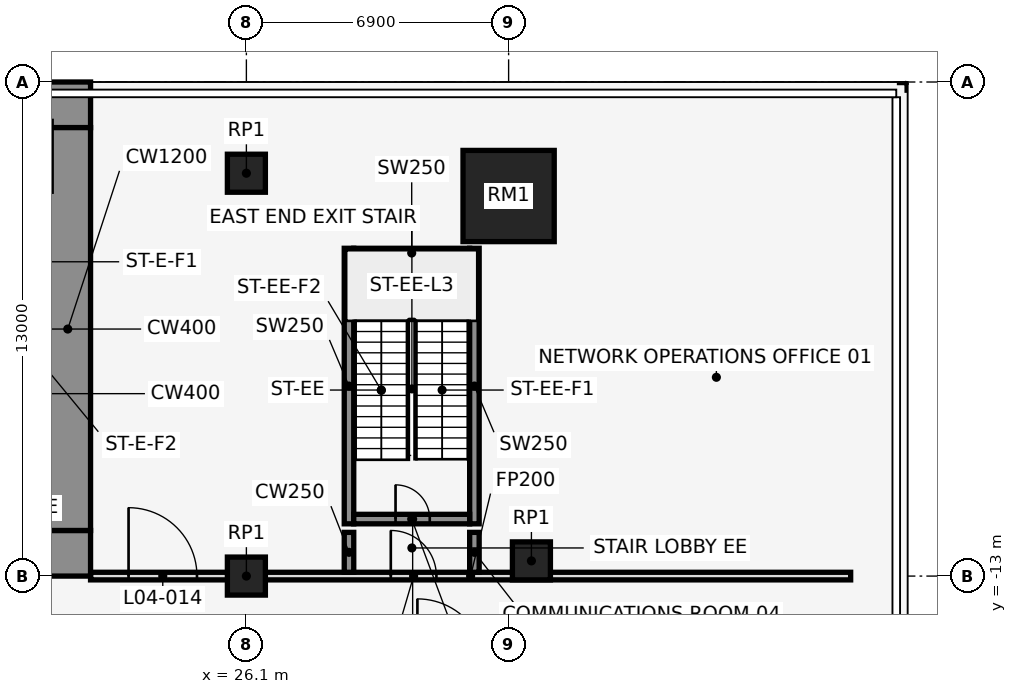
"""IFC4 building model, lengths in metres.
Left out: names, types, materials, properties, quantities, classifications, styles, units other than length and angle.
Written with IfcOpenShell. Run it as: python <this file> out.ifc"""

import sys

from ifc_helpers import new_model, si_unit, direction, frame, frame_2d, origin, origin_2d, place, context, subcontext, project, spatial, rectangle, extrude, element, fill, save


model = new_model("IFC4")
c1 = context("Model", 3, precision=1e-05, world=origin(), true_north=direction((0.0, 1.0)))
c2 = subcontext(c1, "Body", "Model", "MODEL_VIEW")
j1 = project(units=[si_unit("LENGTHUNIT", "METRE"), si_unit("PLANEANGLEUNIT", "RADIAN")], contexts=[c1])
p1 = place(None, origin())
s1 = spatial("IfcSite", under=j1, at=p1, CompositionType="ELEMENT")
p2 = place(p1, origin())
s2 = spatial("IfcBuilding", under=s1, at=p2, CompositionType="ELEMENT")
p3 = place(p2, frame((0.0, 0.0, 25.0)))
s3 = spatial("IfcBuildingStorey", under=s2, at=p3, CompositionType="ELEMENT", Elevation=25.0)
p4 = place(p3, frame((26.1, -2.4, 0.0), z_axis=(0.0, 0.0, 1.0), x_axis=(1.0, 0.0, 0.0)))
e1 = element("IfcColumn", 1, at=p4, inside=s3, PredefinedType="COLUMN", context=c2, shape_type="SweptSolid", body=[
    extrude(rectangle(XDim=1.0, YDim=1.0, at=origin_2d()), origin(), (0.0, 0.0, 1.0), 5.0),
])
p5 = place(p3, frame((33.0, -3.0, 0.0), z_axis=(0.0, 0.0, 1.0), x_axis=(1.0, 0.0, 0.0)))
e2 = element("IfcColumn", 2, at=p5, inside=s3, PredefinedType="COLUMN", context=c2, shape_type="SweptSolid", body=[
    extrude(rectangle(XDim=2.4, YDim=2.4, at=origin_2d()), origin(), (0.0, 0.0, 1.0), 5.0),
])
for number, where, z_axis, x_axis in (
    (3, (33.6, -12.6, 0.0), (0.0, 0.0, 1.0), (1.0, 0.0, 0.0)),
    (4, (26.1, -13.0, 0.0), (0.0, 0.0, 1.0), (1.0, 0.0, 0.0)),
):
    element("IfcColumn", number, at=place(p3, frame(where, z_axis=z_axis, x_axis=x_axis)), inside=s3, PredefinedType="COLUMN", context=c2, shape_type="SweptSolid", body=[
        extrude(rectangle(XDim=1.0, YDim=1.0, at=origin_2d()), origin(), (0.0, 0.0, 1.0), 5.0),
    ])
for number, where, z_axis, x_axis in (
    (5, (28.8, -11.625, 0.0), (0.0, 0.0, 1.0), (0.0, 1.0, 0.0)),
    (6, (32.1, -11.625, 0.0), (0.0, 0.0, 1.0), (0.0, 1.0, 0.0)),
):
    element("IfcWall", number, at=place(p3, frame(where, z_axis=z_axis, x_axis=x_axis)), inside=s3, PredefinedType="SHEAR", context=c2, shape_type="SweptSolid", body=[
        extrude(rectangle(XDim=7.25, YDim=0.25, at=frame_2d((3.625, 0.0))), origin(), (0.0, 0.0, 1.0), 5.0),
    ])
p6 = place(p3, frame((28.925, -11.5, 0.0), z_axis=(0.0, 0.0, 1.0), x_axis=(1.0, 0.0, 0.0)))
e7 = element("IfcWall", 7, at=p6, inside=s3, PredefinedType="SHEAR", context=c2, shape_type="SweptSolid", body=[
    extrude(rectangle(XDim=3.05, YDim=0.25, at=frame_2d((1.525, 0.0))), origin(), (0.0, 0.0, 1.0), 5.0),
])
p7 = place(p6, frame((1.1, 0.0, 0.0)))
e8 = element("IfcOpeningElement", 8, at=p7, cuts=e7, PredefinedType="OPENING", context=c2, shape_type="SweptSolid", body=[
    extrude(rectangle(XDim=0.9, YDim=2.1, at=frame_2d((0.45, 1.05))), frame((0.0, 0.137, 0.0), z_axis=(0.0, -1.0, 0.0), x_axis=(1.0, 0.0, 0.0)), (0.0, 0.0, 1.0), 0.274),
])
p8 = place(p3, frame((28.925, -4.5, 0.0), z_axis=(0.0, 0.0, 1.0), x_axis=(1.0, 0.0, 0.0)))
e9 = element("IfcWall", 9, at=p8, inside=s3, PredefinedType="SHEAR", context=c2, shape_type="SweptSolid", body=[
    extrude(rectangle(XDim=3.05, YDim=0.25, at=frame_2d((1.525, 0.0))), origin(), (0.0, 0.0, 1.0), 5.0),
])
p9 = place(p3, frame((22.0, -13.0, 0.0), z_axis=(0.0, 0.0, 1.0), x_axis=(1.0, 0.0, 0.0)))
e10 = element("IfcWall", 10, at=p9, inside=s3, PredefinedType="PARTITIONING", context=c2, shape_type="SweptSolid", body=[
    extrude(rectangle(XDim=20.0, YDim=0.2, at=frame_2d((10.0, 0.0))), origin(), (0.0, 0.0, 1.0), 4.7),
])
p10 = place(p9, frame((7.9, 0.0, 0.0)))
e11 = element("IfcOpeningElement", 11, at=p10, cuts=e10, PredefinedType="OPENING", context=c2, shape_type="SweptSolid", body=[
    extrude(rectangle(XDim=1.2, YDim=2.1, at=frame_2d((0.6, 1.05))), frame((0.0, 0.112, 0.0), z_axis=(0.0, -1.0, 0.0), x_axis=(1.0, 0.0, 0.0)), (0.0, 0.0, 1.0), 0.224),
])
p11 = place(p9, frame((1.0, 0.0, 0.0)))
e12 = element("IfcOpeningElement", 12, at=p11, cuts=e10, PredefinedType="OPENING", context=c2, shape_type="SweptSolid", body=[
    extrude(rectangle(XDim=1.8, YDim=2.1, at=frame_2d((0.9, 1.05))), frame((0.0, 0.112, 0.0), z_axis=(0.0, -1.0, 0.0), x_axis=(1.0, 0.0, 0.0)), (0.0, 0.0, 1.0), 0.224),
])
for number, where, z_axis, x_axis in (
    (13, (28.8, -12.9, 0.0), (0.0, 0.0, 1.0), (0.0, 1.0, 0.0)),
    (14, (32.1, -12.9, 0.0), (0.0, 0.0, 1.0), (0.0, 1.0, 0.0)),
):
    element("IfcWall", number, at=place(p3, frame(where, z_axis=z_axis, x_axis=x_axis)), inside=s3, PredefinedType="SHEAR", context=c2, shape_type="SweptSolid", body=[
        extrude(rectangle(XDim=1.05, YDim=0.25, at=frame_2d((0.525, 0.0))), origin(), (0.0, 0.0, 1.0), 5.0),
    ])
p12 = place(p3, frame((-22.0, -0.6, 0.0), z_axis=(0.0, 0.0, 1.0), x_axis=(1.0, 0.0, 0.0)))
e15 = element("IfcWall", 15, at=p12, inside=s3, PredefinedType="SHEAR", context=c2, shape_type="SweptSolid", body=[
    extrude(rectangle(XDim=44.0, YDim=1.2, at=frame_2d((22.0, 0.0))), origin(), (0.0, 0.0, 1.0), 5.0),
])
p13 = place(p3, frame((-22.0, -12.4, 0.0), z_axis=(0.0, 0.0, 1.0), x_axis=(1.0, 0.0, 0.0)))
e16 = element("IfcWall", 16, at=p13, inside=s3, PredefinedType="SHEAR", context=c2, shape_type="SweptSolid", body=[
    extrude(rectangle(XDim=44.0, YDim=1.2, at=frame_2d((22.0, 0.0))), origin(), (0.0, 0.0, 1.0), 5.0),
])
p14 = place(p13, frame((2.2, 0.0, 0.0)))
e17 = element("IfcOpeningElement", 17, at=p14, cuts=e16, PredefinedType="OPENING", context=c2, shape_type="SweptSolid", body=[
    extrude(rectangle(XDim=1.2, YDim=2.1, at=frame_2d((0.6, 1.05))), frame((0.0, 0.612, 0.0), z_axis=(0.0, -1.0, 0.0), x_axis=(1.0, 0.0, 0.0)), (0.0, 0.0, 1.0), 1.224),
])
p15 = place(p13, frame((21.4, 0.0, 0.0)))
e18 = element("IfcOpeningElement", 18, at=p15, cuts=e16, PredefinedType="OPENING", context=c2, shape_type="SweptSolid", body=[
    extrude(rectangle(XDim=1.2, YDim=2.1, at=frame_2d((0.6, 1.05))), frame((0.0, 0.612, 0.0), z_axis=(0.0, -1.0, 0.0), x_axis=(1.0, 0.0, 0.0)), (0.0, 0.0, 1.0), 1.224),
])
p16 = place(p13, frame((40.6, 0.0, 0.0)))
e19 = element("IfcOpeningElement", 19, at=p16, cuts=e16, PredefinedType="OPENING", context=c2, shape_type="SweptSolid", body=[
    extrude(rectangle(XDim=1.2, YDim=2.1, at=frame_2d((0.6, 1.05))), frame((0.0, 0.612, 0.0), z_axis=(0.0, -1.0, 0.0), x_axis=(1.0, 0.0, 0.0)), (0.0, 0.0, 1.0), 1.224),
])
p17 = place(p13, frame((16.0, 0.0, 0.0)))
e20 = element("IfcOpeningElement", 20, at=p17, cuts=e16, PredefinedType="OPENING", context=c2, shape_type="SweptSolid", body=[
    extrude(rectangle(XDim=1.8, YDim=2.1, at=frame_2d((0.9, 1.05))), frame((0.0, 0.612, 0.0), z_axis=(0.0, -1.0, 0.0), x_axis=(1.0, 0.0, 0.0)), (0.0, 0.0, 1.0), 1.224),
])
p18 = place(p13, frame((6.3, 0.0, 0.0)))
e21 = element("IfcOpeningElement", 21, at=p18, cuts=e16, PredefinedType="OPENING", context=c2, shape_type="SweptSolid", body=[
    extrude(rectangle(XDim=1.2, YDim=2.1, at=frame_2d((0.6, 1.05))), frame((0.0, 0.612, 0.0), z_axis=(0.0, -1.0, 0.0), x_axis=(1.0, 0.0, 0.0)), (0.0, 0.0, 1.0), 1.224),
])
p19 = place(p13, frame((26.2, 0.0, 0.0)))
e22 = element("IfcOpeningElement", 22, at=p19, cuts=e16, PredefinedType="OPENING", context=c2, shape_type="SweptSolid", body=[
    extrude(rectangle(XDim=1.8, YDim=2.1, at=frame_2d((0.9, 1.05))), frame((0.0, 0.612, 0.0), z_axis=(0.0, -1.0, 0.0), x_axis=(1.0, 0.0, 0.0)), (0.0, 0.0, 1.0), 1.224),
])
p20 = place(p13, frame((36.5, 0.0, 0.0)))
e23 = element("IfcOpeningElement", 23, at=p20, cuts=e16, PredefinedType="OPENING", context=c2, shape_type="SweptSolid", body=[
    extrude(rectangle(XDim=1.2, YDim=2.1, at=frame_2d((0.6, 1.05))), frame((0.0, 0.612, 0.0), z_axis=(0.0, -1.0, 0.0), x_axis=(1.0, 0.0, 0.0)), (0.0, 0.0, 1.0), 1.224),
])
p21 = place(p3, frame((21.4, -11.8, 0.0), z_axis=(0.0, 0.0, 1.0), x_axis=(0.0, 1.0, 0.0)))
e24 = element("IfcWall", 24, at=p21, inside=s3, PredefinedType="SHEAR", context=c2, shape_type="SweptSolid", body=[
    extrude(rectangle(XDim=10.6, YDim=1.2, at=frame_2d((5.3, 0.0))), origin(), (0.0, 0.0, 1.0), 5.0),
])
p22 = place(p10, origin())
e25 = element("IfcDoor", 25, at=p22, inside=s3, OperationType="SINGLE_SWING_LEFT", PredefinedType="DOOR", context=c2, shape_type="SweptSolid", body=[
    extrude(rectangle(XDim=1.2, YDim=2.1, at=frame_2d((0.6, 1.05))), frame((0.0, 0.025, 0.0), z_axis=(0.0, -1.0, 0.0), x_axis=(1.0, 0.0, 0.0)), (0.0, 0.0, 1.0), 0.05),
])
fill(e11, e25)
p23 = place(p7, origin())
e26 = element("IfcDoor", 26, at=p23, inside=s3, OperationType="SINGLE_SWING_RIGHT", PredefinedType="DOOR", context=c2, shape_type="SweptSolid", body=[
    extrude(rectangle(XDim=0.9, YDim=2.1, at=frame_2d((0.45, 1.05))), frame((0.0, 0.025, 0.0), z_axis=(0.0, -1.0, 0.0), x_axis=(1.0, 0.0, 0.0)), (0.0, 0.0, 1.0), 0.05),
])
fill(e8, e26)
p24 = place(p11, origin())
e27 = element("IfcDoor", 27, at=p24, inside=s3, OperationType="SINGLE_SWING_LEFT", PredefinedType="DOOR", context=c2, shape_type="SweptSolid", body=[
    extrude(rectangle(XDim=1.8, YDim=2.1, at=frame_2d((0.9, 1.05))), frame((0.0, 0.025, 0.0), z_axis=(0.0, -1.0, 0.0), x_axis=(1.0, 0.0, 0.0)), (0.0, 0.0, 1.0), 0.05),
])
fill(e12, e27)
save(model, sys.argv[1])
